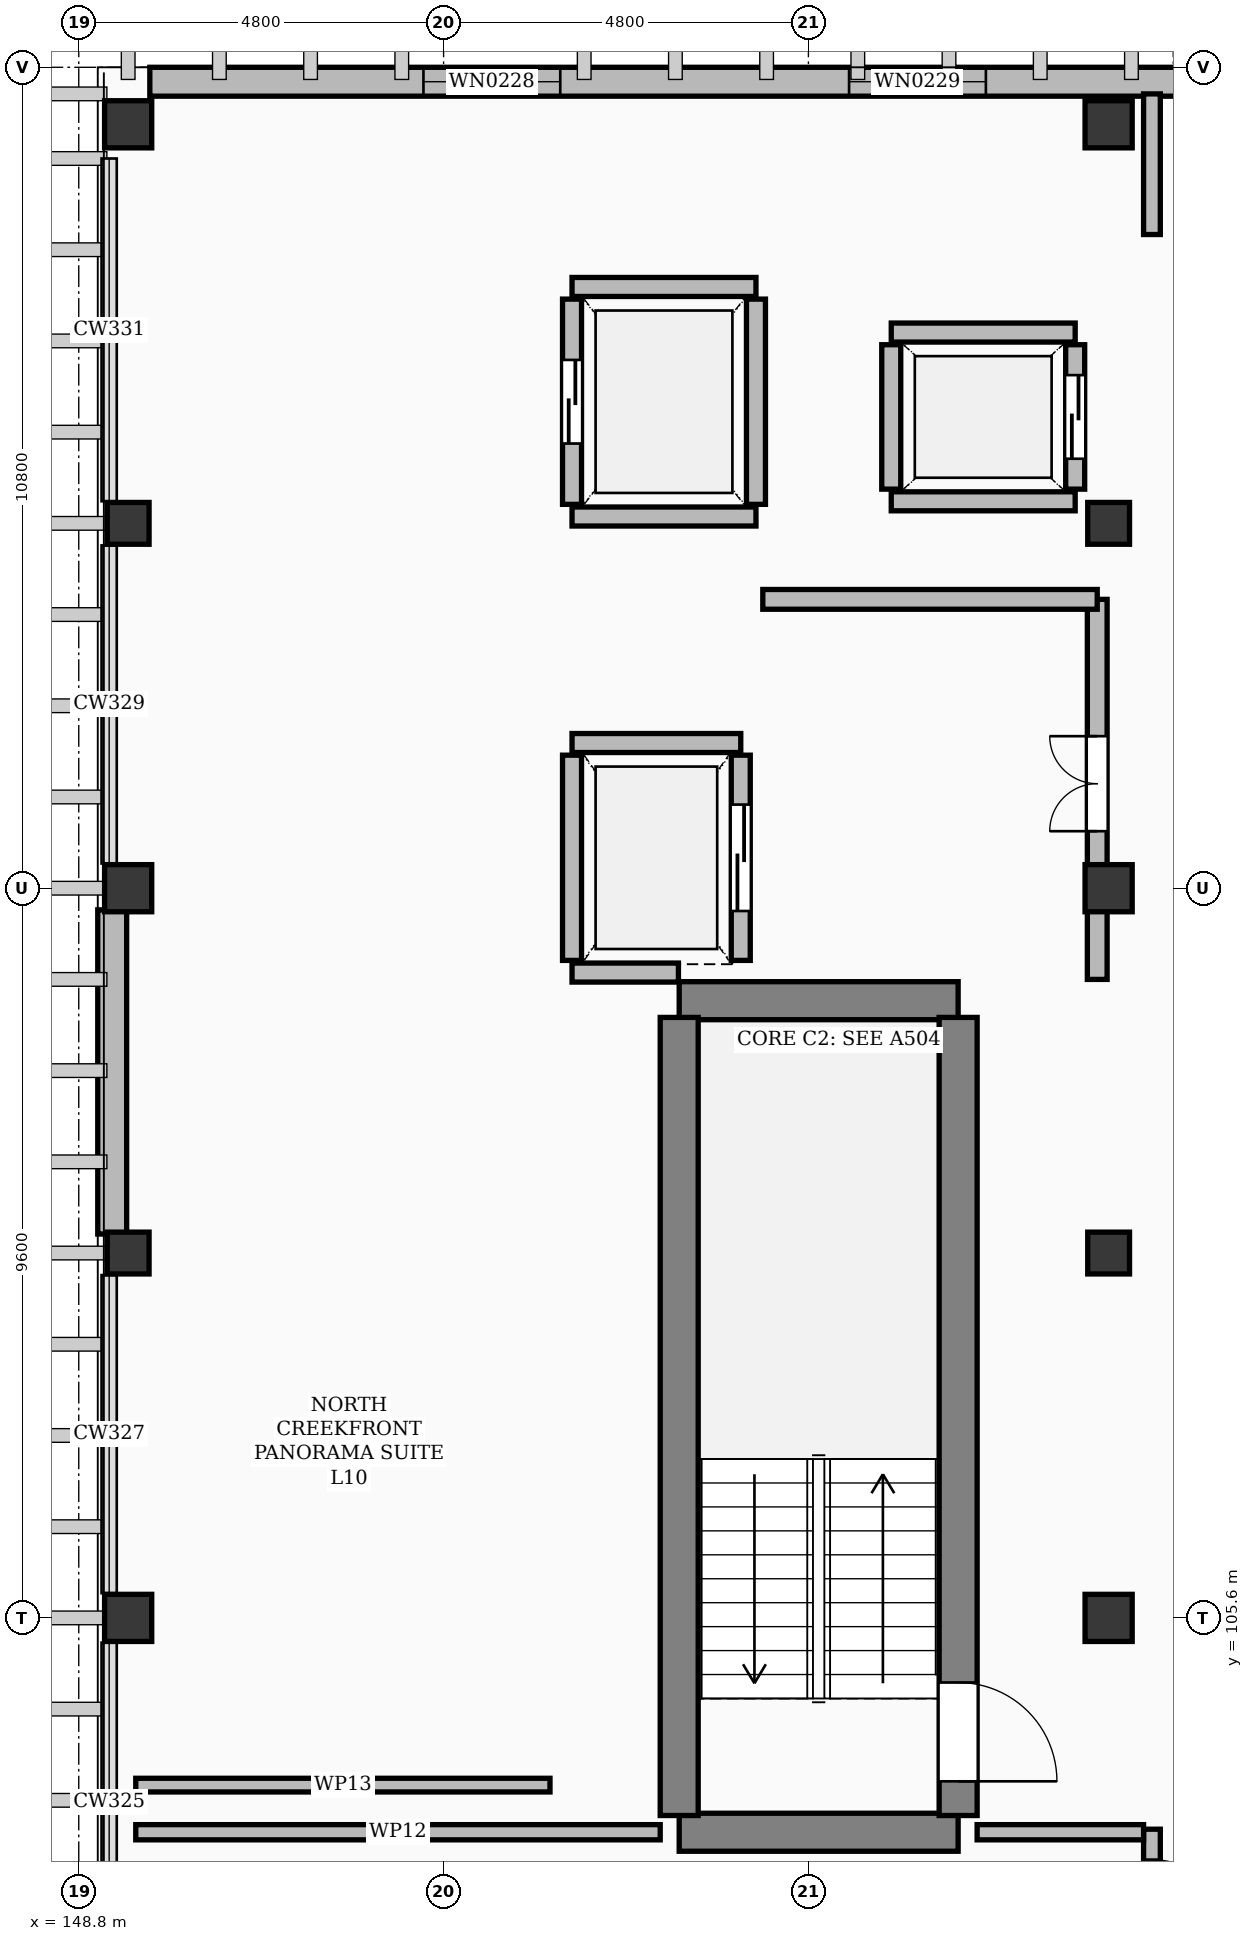
"""IFC4 building model, lengths in metres.
Left out: names, types, materials, properties, quantities, classifications, styles, units other than length and angle.
Written with IfcOpenShell. Run it as: python <this file> out.ifc"""

import sys

from ifc_helpers import new_model, si_unit, direction, frame, frame_2d, origin, origin_2d, place, context, subcontext, project, spatial, rectangle, extrude, element, fill, save


model = new_model("IFC4")
c1 = context("Model", 3, precision=1e-05, world=origin(), true_north=direction((0.0, 1.0)))
c2 = subcontext(c1, "Body", "Model", "MODEL_VIEW")
j1 = project(units=[si_unit("LENGTHUNIT", "METRE"), si_unit("PLANEANGLEUNIT", "RADIAN")], contexts=[c1])
p1 = place(None, origin())
s1 = spatial("IfcSite", under=j1, at=p1, CompositionType="ELEMENT")
p2 = place(p1, origin())
s2 = spatial("IfcBuilding", under=s1, at=p2, CompositionType="ELEMENT")
p3 = place(p2, frame((0.0, 0.0, 42.6)))
s3 = spatial("IfcBuildingStorey", under=s2, at=p3, CompositionType="ELEMENT", Elevation=42.6)
for number, where, z_axis, x_axis in (
    (1, (149.45, 105.6, 0.0), (0.0, 0.0, 1.0), (1.0, 0.0, 0.0)),
    (2, (149.45, 115.2, 0.0), (0.0, 0.0, 1.0), (1.0, 0.0, 0.0)),
    (3, (149.45, 125.25, 0.0), (0.0, 0.0, 1.0), (1.0, 0.0, 0.0)),
    (4, (162.35, 105.6, 0.0), (0.0, 0.0, 1.0), (1.0, 0.0, 0.0)),
    (5, (162.35, 115.2, 0.0), (0.0, 0.0, 1.0), (1.0, 0.0, 0.0)),
    (6, (162.35, 125.25, 0.0), (0.0, 0.0, 1.0), (1.0, 0.0, 0.0)),
):
    element("IfcColumn", number, at=place(p3, frame(where, z_axis=z_axis, x_axis=x_axis)), inside=s3, PredefinedType="COLUMN", context=c2, shape_type="SweptSolid", body=[
        extrude(rectangle(XDim=0.62, YDim=0.62, at=origin_2d()), origin(), (0.0, 0.0, 1.0), 3.9),
    ])
for number, where, z_axis, x_axis in (
    (7, (149.45, 110.4, 0.0), (0.0, 0.0, 1.0), (1.0, 0.0, 0.0)),
    (8, (149.45, 120.0, 0.0), (0.0, 0.0, 1.0), (1.0, 0.0, 0.0)),
    (9, (162.35, 110.4, 0.0), (0.0, 0.0, 1.0), (1.0, 0.0, 0.0)),
    (10, (162.35, 120.0, 0.0), (0.0, 0.0, 1.0), (1.0, 0.0, 0.0)),
):
    element("IfcColumn", number, at=place(p3, frame(where, z_axis=z_axis, x_axis=x_axis)), inside=s3, PredefinedType="COLUMN", context=c2, shape_type="SweptSolid", body=[
        extrude(rectangle(XDim=0.55, YDim=0.55, at=origin_2d()), origin(), (0.0, 0.0, 1.0), 3.9),
    ])
p4 = place(p3, frame((149.735, 125.81, 0.0), z_axis=(0.0, 0.0, 1.0), x_axis=(1.0, 0.0, 0.0)))
e11 = element("IfcWall", 11, at=p4, inside=s3, PredefinedType="SOLIDWALL", context=c2, shape_type="SweptSolid", body=[
    extrude(rectangle(XDim=29.33, YDim=0.38, at=frame_2d((14.665, 0.0))), origin(), (0.0, 0.0, 1.0), 3.66),
])
p5 = place(p4, frame((3.6, 0.0, 0.55)))
e12 = element("IfcOpeningElement", 12, at=p5, cuts=e11, PredefinedType="OPENING", context=c2, shape_type="SweptSolid", body=[
    extrude(rectangle(XDim=1.8, YDim=1.76, at=frame_2d((0.9, 0.88))), frame((0.0, 0.202, 0.0), z_axis=(0.0, -1.0, 0.0), x_axis=(1.0, 0.0, 0.0)), (0.0, 0.0, 1.0), 0.404),
])
p6 = place(p4, frame((9.2, 0.0, 0.55)))
e13 = element("IfcOpeningElement", 13, at=p6, cuts=e11, PredefinedType="OPENING", context=c2, shape_type="SweptSolid", body=[
    extrude(rectangle(XDim=1.8, YDim=1.76, at=frame_2d((0.9, 0.88))), frame((0.0, 0.202, 0.0), z_axis=(0.0, -1.0, 0.0), x_axis=(1.0, 0.0, 0.0)), (0.0, 0.0, 1.0), 0.404),
])
p7 = place(p4, frame((19.6, 0.0, 0.55)))
e14 = element("IfcOpeningElement", 14, at=p7, cuts=e11, PredefinedType="OPENING", context=c2, shape_type="SweptSolid", body=[
    extrude(rectangle(XDim=1.8, YDim=1.76, at=frame_2d((0.9, 0.88))), frame((0.0, 0.202, 0.0), z_axis=(0.0, -1.0, 0.0), x_axis=(1.0, 0.0, 0.0)), (0.0, 0.0, 1.0), 0.404),
])
p8 = place(p4, frame((25.2, 0.0, 0.55)))
e15 = element("IfcOpeningElement", 15, at=p8, cuts=e11, PredefinedType="OPENING", context=c2, shape_type="SweptSolid", body=[
    extrude(rectangle(XDim=1.8, YDim=1.76, at=frame_2d((0.9, 0.88))), frame((0.0, 0.202, 0.0), z_axis=(0.0, -1.0, 0.0), x_axis=(1.0, 0.0, 0.0)), (0.0, 0.0, 1.0), 0.404),
])
p9 = place(p3, frame((149.24, 110.65, 0.0), z_axis=(0.0, 0.0, 1.0), x_axis=(0.0, 1.0, 0.0)))
e16 = element("IfcWall", 16, at=p9, inside=s3, PredefinedType="SOLIDWALL", context=c2, shape_type="SweptSolid", body=[
    extrude(rectangle(XDim=4.265, YDim=0.38, at=frame_2d((2.133, 0.0))), origin(), (0.0, 0.0, 1.0), 3.072),
])
for number, where, z_axis, x_axis in (
    (17, (156.7, 102.78, 0.0), (0.0, 0.0, 1.0), (1.0, 0.0, 0.0)),
    (18, (156.7, 113.72, 0.0), (0.0, 0.0, 1.0), (1.0, 0.0, 0.0)),
):
    element("IfcWall", number, at=place(p3, frame(where, z_axis=z_axis, x_axis=x_axis)), inside=s3, PredefinedType="SHEAR", context=c2, shape_type="SweptSolid", body=[
        extrude(rectangle(XDim=3.67, YDim=0.5, at=frame_2d((1.835, 0.0))), origin(), (0.0, 0.0, 1.0), 3.66),
    ])
p10 = place(p3, frame((156.7, 103.0, 0.0), z_axis=(0.0, 0.0, 1.0), x_axis=(0.0, 1.0, 0.0)))
e19 = element("IfcWall", 19, at=p10, inside=s3, PredefinedType="SHEAR", context=c2, shape_type="SweptSolid", body=[
    extrude(rectangle(XDim=10.5, YDim=0.5, at=frame_2d((5.25, 0.0))), origin(), (0.0, 0.0, 1.0), 3.66),
])
p11 = place(p3, frame((160.37, 103.0, 0.0), z_axis=(0.0, 0.0, 1.0), x_axis=(0.0, 1.0, 0.0)))
e20 = element("IfcWall", 20, at=p11, inside=s3, PredefinedType="SHEAR", context=c2, shape_type="SweptSolid", body=[
    extrude(rectangle(XDim=10.5, YDim=0.5, at=frame_2d((5.25, 0.0))), origin(), (0.0, 0.0, 1.0), 3.66),
])
p12 = place(p11, frame((0.45, 0.0, 0.0)))
e21 = element("IfcOpeningElement", 21, at=p12, cuts=e20, PredefinedType="OPENING", context=c2, shape_type="SweptSolid", body=[
    extrude(rectangle(XDim=1.3, YDim=2.15, at=frame_2d((0.65, 1.075))), frame((0.0, 0.262, 0.0), z_axis=(0.0, -1.0, 0.0), x_axis=(1.0, 0.0, 0.0)), (0.0, 0.0, 1.0), 0.524),
])
p13 = place(p3, frame((155.29, 114.09, 0.0), z_axis=(0.0, 0.0, 1.0), x_axis=(1.0, 0.0, 0.0)))
e22 = element("IfcWall", 22, at=p13, inside=s3, PredefinedType="SOLIDWALL", context=c2, shape_type="SweptSolid", body=[
    extrude(rectangle(XDim=1.4, YDim=0.25, at=frame_2d((0.7, 0.0))), origin(), (0.0, 0.0, 1.0), 3.66),
])
p14 = place(p3, frame((155.29, 117.11, 0.0), z_axis=(0.0, 0.0, 1.0), x_axis=(1.0, 0.0, 0.0)))
e23 = element("IfcWall", 23, at=p14, inside=s3, PredefinedType="SOLIDWALL", context=c2, shape_type="SweptSolid", body=[
    extrude(rectangle(XDim=2.22, YDim=0.25, at=frame_2d((1.11, 0.0))), origin(), (0.0, 0.0, 1.0), 3.66),
])
p15 = place(p3, frame((155.29, 114.25, 0.0), z_axis=(0.0, 0.0, 1.0), x_axis=(0.0, 1.0, 0.0)))
e24 = element("IfcWall", 24, at=p15, inside=s3, PredefinedType="SOLIDWALL", context=c2, shape_type="SweptSolid", body=[
    extrude(rectangle(XDim=2.7, YDim=0.25, at=frame_2d((1.35, 0.0))), origin(), (0.0, 0.0, 1.0), 3.072),
])
p16 = place(p3, frame((157.51, 114.25, 0.0), z_axis=(0.0, 0.0, 1.0), x_axis=(0.0, 1.0, 0.0)))
e25 = element("IfcWall", 25, at=p16, inside=s3, PredefinedType="SOLIDWALL", context=c2, shape_type="SweptSolid", body=[
    extrude(rectangle(XDim=2.7, YDim=0.25, at=frame_2d((1.35, 0.0))), origin(), (0.0, 0.0, 1.0), 3.072),
])
p17 = place(p16, frame((0.65, 0.0, 0.0)))
e26 = element("IfcOpeningElement", 26, at=p17, cuts=e25, PredefinedType="OPENING", context=c2, shape_type="SweptSolid", body=[
    extrude(rectangle(XDim=1.4, YDim=2.3, at=frame_2d((0.7, 1.15))), frame((0.0, 0.137, 0.0), z_axis=(0.0, -1.0, 0.0), x_axis=(1.0, 0.0, 0.0)), (0.0, 0.0, 1.0), 0.274),
])
p18 = place(p3, frame((159.49, 120.29, 0.0), z_axis=(0.0, 0.0, 1.0), x_axis=(1.0, 0.0, 0.0)))
e27 = element("IfcWall", 27, at=p18, inside=s3, PredefinedType="SOLIDWALL", context=c2, shape_type="SweptSolid", body=[
    extrude(rectangle(XDim=2.42, YDim=0.25, at=frame_2d((1.21, 0.0))), origin(), (0.0, 0.0, 1.0), 3.072),
])
p19 = place(p3, frame((159.49, 122.51, 0.0), z_axis=(0.0, 0.0, 1.0), x_axis=(1.0, 0.0, 0.0)))
e28 = element("IfcWall", 28, at=p19, inside=s3, PredefinedType="SOLIDWALL", context=c2, shape_type="SweptSolid", body=[
    extrude(rectangle(XDim=2.42, YDim=0.25, at=frame_2d((1.21, 0.0))), origin(), (0.0, 0.0, 1.0), 3.66),
])
p20 = place(p3, frame((159.49, 120.45, 0.0), z_axis=(0.0, 0.0, 1.0), x_axis=(0.0, 1.0, 0.0)))
e29 = element("IfcWall", 29, at=p20, inside=s3, PredefinedType="SOLIDWALL", context=c2, shape_type="SweptSolid", body=[
    extrude(rectangle(XDim=1.9, YDim=0.25, at=frame_2d((0.95, 0.0))), origin(), (0.0, 0.0, 1.0), 3.66),
])
p21 = place(p3, frame((161.91, 120.45, 0.0), z_axis=(0.0, 0.0, 1.0), x_axis=(0.0, 1.0, 0.0)))
e30 = element("IfcWall", 30, at=p21, inside=s3, PredefinedType="SOLIDWALL", context=c2, shape_type="SweptSolid", body=[
    extrude(rectangle(XDim=1.9, YDim=0.25, at=frame_2d((0.95, 0.0))), origin(), (0.0, 0.0, 1.0), 3.66),
])
p22 = place(p21, frame((0.4, 0.0, 0.0)))
e31 = element("IfcOpeningElement", 31, at=p22, cuts=e30, PredefinedType="OPENING", context=c2, shape_type="SweptSolid", body=[
    extrude(rectangle(XDim=1.1, YDim=2.2, at=frame_2d((0.55, 1.1))), frame((0.0, 0.137, 0.0), z_axis=(0.0, -1.0, 0.0), x_axis=(1.0, 0.0, 0.0)), (0.0, 0.0, 1.0), 0.274),
])
p23 = place(p3, frame((155.29, 120.09, 0.0), z_axis=(0.0, 0.0, 1.0), x_axis=(1.0, 0.0, 0.0)))
e32 = element("IfcWall", 32, at=p23, inside=s3, PredefinedType="SOLIDWALL", context=c2, shape_type="SweptSolid", body=[
    extrude(rectangle(XDim=2.42, YDim=0.25, at=frame_2d((1.21, 0.0))), origin(), (0.0, 0.0, 1.0), 3.072),
])
p24 = place(p3, frame((155.29, 123.11, 0.0), z_axis=(0.0, 0.0, 1.0), x_axis=(1.0, 0.0, 0.0)))
e33 = element("IfcWall", 33, at=p24, inside=s3, PredefinedType="SOLIDWALL", context=c2, shape_type="SweptSolid", body=[
    extrude(rectangle(XDim=2.42, YDim=0.25, at=frame_2d((1.21, 0.0))), origin(), (0.0, 0.0, 1.0), 3.66),
])
p25 = place(p3, frame((155.29, 120.25, 0.0), z_axis=(0.0, 0.0, 1.0), x_axis=(0.0, 1.0, 0.0)))
e34 = element("IfcWall", 34, at=p25, inside=s3, PredefinedType="SOLIDWALL", context=c2, shape_type="SweptSolid", body=[
    extrude(rectangle(XDim=2.7, YDim=0.25, at=frame_2d((1.35, 0.0))), origin(), (0.0, 0.0, 1.0), 3.072),
])
p26 = place(p25, frame((0.8, 0.0, 0.0)))
e35 = element("IfcOpeningElement", 35, at=p26, cuts=e34, PredefinedType="OPENING", context=c2, shape_type="SweptSolid", body=[
    extrude(rectangle(XDim=1.1, YDim=2.2, at=frame_2d((0.55, 1.1))), frame((0.0, 0.137, 0.0), z_axis=(0.0, -1.0, 0.0), x_axis=(1.0, 0.0, 0.0)), (0.0, 0.0, 1.0), 0.274),
])
p27 = place(p3, frame((157.71, 120.25, 0.0), z_axis=(0.0, 0.0, 1.0), x_axis=(0.0, 1.0, 0.0)))
e36 = element("IfcWall", 36, at=p27, inside=s3, PredefinedType="SOLIDWALL", context=c2, shape_type="SweptSolid", body=[
    extrude(rectangle(XDim=2.7, YDim=0.25, at=frame_2d((1.35, 0.0))), origin(), (0.0, 0.0, 1.0), 3.072),
])
p28 = place(p3, frame((162.2, 114.0, 0.0), z_axis=(0.0, 0.0, 1.0), x_axis=(0.0, 1.0, 0.0)))
e37 = element("IfcWall", 37, at=p28, inside=s3, PredefinedType="SOLIDWALL", context=c2, shape_type="SweptSolid", body=[
    extrude(rectangle(XDim=5.0, YDim=0.26, at=frame_2d((2.5, 0.0))), origin(), (0.0, 0.0, 1.0), 3.072),
])
p29 = place(p28, frame((1.95, 0.0, 0.0)))
e38 = element("IfcOpeningElement", 38, at=p29, cuts=e37, PredefinedType="OPENING", context=c2, shape_type="SweptSolid", body=[
    extrude(rectangle(XDim=1.25, YDim=2.15, at=frame_2d((0.625, 1.075))), frame((0.0, 0.142, 0.0), z_axis=(0.0, -1.0, 0.0), x_axis=(1.0, 0.0, 0.0)), (0.0, 0.0, 1.0), 0.284),
])
p30 = place(p3, frame((157.8, 119.0, 0.0), z_axis=(0.0, 0.0, 1.0), x_axis=(1.0, 0.0, 0.0)))
e39 = element("IfcWall", 39, at=p30, inside=s3, PredefinedType="SOLIDWALL", context=c2, shape_type="SweptSolid", body=[
    extrude(rectangle(XDim=4.4, YDim=0.26, at=frame_2d((2.2, 0.0))), origin(), (0.0, 0.0, 1.0), 3.072),
])
p31 = place(p3, frame((162.92, 95.6, 0.0), z_axis=(0.0, 0.0, 1.0), x_axis=(0.0, 1.0, 0.0)))
e40 = element("IfcWall", 40, at=p31, inside=s3, PredefinedType="PARTITIONING", context=c2, shape_type="SweptSolid", body=[
    extrude(rectangle(XDim=7.22, YDim=0.22, at=frame_2d((3.61, 0.0))), origin(), (0.0, 0.0, 1.0), 3.072),
])
p32 = place(p31, frame((2.05, 0.0, 0.0)))
e41 = element("IfcOpeningElement", 41, at=p32, cuts=e40, PredefinedType="OPENING", context=c2, shape_type="SweptSolid", body=[
    extrude(rectangle(XDim=1.28, YDim=2.16, at=frame_2d((0.64, 1.08))), frame((0.0, 0.122, 0.0), z_axis=(0.0, -1.0, 0.0), x_axis=(1.0, 0.0, 0.0)), (0.0, 0.0, 1.0), 0.244),
])
p33 = place(p31, frame((5.8, 0.0, 0.0)))
e42 = element("IfcOpeningElement", 42, at=p33, cuts=e40, PredefinedType="OPENING", context=c2, shape_type="SweptSolid", body=[
    extrude(rectangle(XDim=1.02, YDim=2.2, at=frame_2d((0.51, 1.1))), frame((0.0, 0.122, 0.0), z_axis=(0.0, -1.0, 0.0), x_axis=(1.0, 0.0, 0.0)), (0.0, 0.0, 1.0), 0.244),
])
p34 = place(p3, frame((162.92, 123.8, 0.0), z_axis=(0.0, 0.0, 1.0), x_axis=(0.0, 1.0, 0.0)))
e43 = element("IfcWall", 43, at=p34, inside=s3, PredefinedType="PARTITIONING", context=c2, shape_type="SweptSolid", body=[
    extrude(rectangle(XDim=1.85, YDim=0.22, at=frame_2d((0.925, 0.0))), origin(), (0.0, 0.0, 1.0), 2.902),
])
p35 = place(p3, frame((149.55, 102.78, 0.0), z_axis=(0.0, 0.0, 1.0), x_axis=(1.0, 0.0, 0.0)))
e44 = element("IfcWall", 44, at=p35, inside=s3, PredefinedType="PARTITIONING", context=c2, shape_type="SweptSolid", body=[
    extrude(rectangle(XDim=6.9, YDim=0.2, at=frame_2d((3.45, 0.0))), origin(), (0.0, 0.0, 1.0), 3.072),
])
p36 = place(p3, frame((160.62, 102.78, 0.0), z_axis=(0.0, 0.0, 1.0), x_axis=(1.0, 0.0, 0.0)))
e45 = element("IfcWall", 45, at=p36, inside=s3, PredefinedType="PARTITIONING", context=c2, shape_type="SweptSolid", body=[
    extrude(rectangle(XDim=2.19, YDim=0.2, at=frame_2d((1.095, 0.0))), origin(), (0.0, 0.0, 1.0), 3.072),
])
p37 = place(p3, frame((149.55, 103.4, 0.0), z_axis=(0.0, 0.0, 1.0), x_axis=(1.0, 0.0, 0.0)))
e46 = element("IfcWall", 46, at=p37, inside=s3, PredefinedType="PARTITIONING", context=c2, shape_type="SweptSolid", body=[
    extrude(rectangle(XDim=5.45, YDim=0.18, at=frame_2d((2.725, 0.0))), origin(), (0.0, 0.0, 1.0), 3.072),
])
p38 = place(p5, origin())
e47 = element("IfcWindow", 47, at=p38, inside=s3, PartitioningType="SINGLE_PANEL", PredefinedType="WINDOW", context=c2, shape_type="SweptSolid", body=[
    extrude(rectangle(XDim=1.8, YDim=1.76, at=frame_2d((0.9, 0.88))), frame((0.0, 0.03, 0.0), z_axis=(0.0, -1.0, 0.0), x_axis=(1.0, 0.0, 0.0)), (0.0, 0.0, 1.0), 0.06),
])
fill(e12, e47)
p39 = place(p6, origin())
e48 = element("IfcWindow", 48, at=p39, inside=s3, PartitioningType="SINGLE_PANEL", PredefinedType="WINDOW", context=c2, shape_type="SweptSolid", body=[
    extrude(rectangle(XDim=1.8, YDim=1.76, at=frame_2d((0.9, 0.88))), frame((0.0, 0.03, 0.0), z_axis=(0.0, -1.0, 0.0), x_axis=(1.0, 0.0, 0.0)), (0.0, 0.0, 1.0), 0.06),
])
fill(e13, e48)
p40 = place(p12, frame((1.3, 0.0, 0.0), z_axis=(0.0, 0.0, 1.0), x_axis=(-1.0, 0.0, 0.0)))
e49 = element("IfcDoor", 49, at=p40, inside=s3, OperationType="SINGLE_SWING_LEFT", PredefinedType="DOOR", context=c2, shape_type="SweptSolid", body=[
    extrude(rectangle(XDim=1.3, YDim=2.15, at=frame_2d((0.65, 1.075))), frame((0.0, 0.025, 0.0), z_axis=(0.0, -1.0, 0.0), x_axis=(1.0, 0.0, 0.0)), (0.0, 0.0, 1.0), 0.05),
])
fill(e21, e49)
p41 = place(p17, origin())
e50 = element("IfcDoor", 50, at=p41, inside=s3, OperationType="SLIDING_TO_LEFT", PredefinedType="DOOR", context=c2, shape_type="SweptSolid", body=[
    extrude(rectangle(XDim=1.4, YDim=2.3, at=frame_2d((0.7, 1.15))), frame((0.0, 0.025, 0.0), z_axis=(0.0, -1.0, 0.0), x_axis=(1.0, 0.0, 0.0)), (0.0, 0.0, 1.0), 0.05),
])
fill(e26, e50)
p42 = place(p22, origin())
e51 = element("IfcDoor", 51, at=p42, inside=s3, OperationType="SLIDING_TO_LEFT", PredefinedType="DOOR", context=c2, shape_type="SweptSolid", body=[
    extrude(rectangle(XDim=1.1, YDim=2.2, at=frame_2d((0.55, 1.1))), frame((0.0, 0.025, 0.0), z_axis=(0.0, -1.0, 0.0), x_axis=(1.0, 0.0, 0.0)), (0.0, 0.0, 1.0), 0.05),
])
fill(e31, e51)
p43 = place(p26, origin())
e52 = element("IfcDoor", 52, at=p43, inside=s3, OperationType="SLIDING_TO_LEFT", PredefinedType="DOOR", context=c2, shape_type="SweptSolid", body=[
    extrude(rectangle(XDim=1.1, YDim=2.2, at=frame_2d((0.55, 1.1))), frame((0.0, 0.025, 0.0), z_axis=(0.0, -1.0, 0.0), x_axis=(1.0, 0.0, 0.0)), (0.0, 0.0, 1.0), 0.05),
])
fill(e35, e52)
p44 = place(p29, origin())
e53 = element("IfcDoor", 53, at=p44, inside=s3, OperationType="DOUBLE_DOOR_SINGLE_SWING", PredefinedType="DOOR", context=c2, shape_type="SweptSolid", body=[
    extrude(rectangle(XDim=1.25, YDim=2.15, at=frame_2d((0.625, 1.075))), frame((0.0, 0.025, 0.0), z_axis=(0.0, -1.0, 0.0), x_axis=(1.0, 0.0, 0.0)), (0.0, 0.0, 1.0), 0.05),
])
fill(e38, e53)
p45 = place(p33, frame((1.02, 0.0, 0.0), z_axis=(0.0, 0.0, 1.0), x_axis=(-1.0, 0.0, 0.0)))
e54 = element("IfcDoor", 54, at=p45, inside=s3, OperationType="SINGLE_SWING_LEFT", PredefinedType="DOOR", context=c2, shape_type="SweptSolid", body=[
    extrude(rectangle(XDim=1.02, YDim=2.2, at=frame_2d((0.51, 1.1))), frame((0.0, 0.025, 0.0), z_axis=(0.0, -1.0, 0.0), x_axis=(1.0, 0.0, 0.0)), (0.0, 0.0, 1.0), 0.05),
])
fill(e42, e54)
save(model, sys.argv[1])
